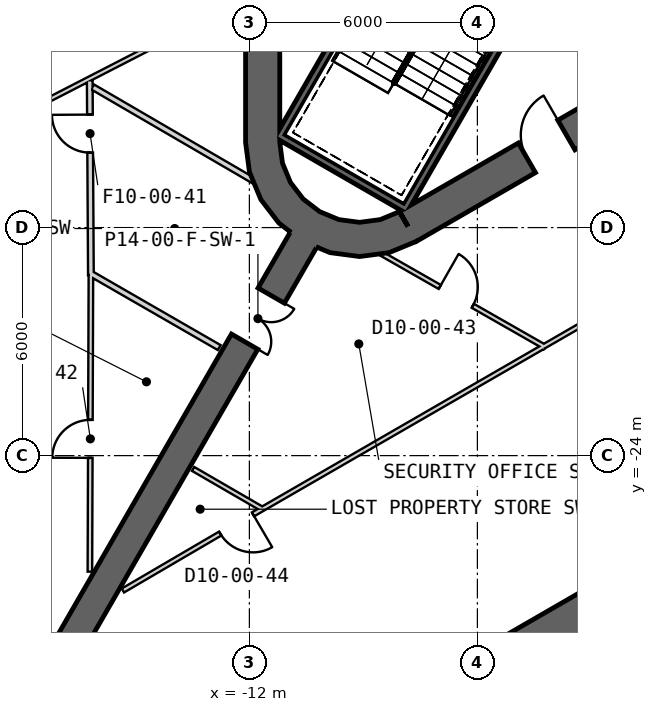
"""IFC4 building model, lengths in metres.
Left out: names, types, materials, properties, quantities, classifications, styles, units other than length and angle.
Written with IfcOpenShell. Run it as: python <this file> out.ifc"""

import sys

from ifc_helpers import new_model, si_unit, direction, frame, frame_2d, origin, place, context, subcontext, project, spatial, polyline, rectangle, outline, extrude, element, fill, save


model = new_model("IFC4")
c1 = context("Model", 3, precision=1e-05, world=origin(), true_north=direction((0.0, 1.0)))
c2 = subcontext(c1, "Body", "Model", "MODEL_VIEW")
j1 = project(units=[si_unit("LENGTHUNIT", "METRE"), si_unit("PLANEANGLEUNIT", "RADIAN")], contexts=[c1])
p1 = place(None, origin())
s1 = spatial("IfcSite", under=j1, at=p1, CompositionType="ELEMENT")
p2 = place(p1, origin())
s2 = spatial("IfcBuilding", under=s1, at=p2, CompositionType="ELEMENT")
p3 = place(p2, origin())
s3 = spatial("IfcBuildingStorey", under=s2, at=p3, CompositionType="ELEMENT", Elevation=0.0)
p4 = place(p3, frame((-11.65, 15.762, 0.0), z_axis=(0.0, 0.0, 1.0), x_axis=(0.0, -1.0, 0.0)))
e1 = element("IfcWall", 1, at=p4, inside=s3, PredefinedType="SHEAR", context=c2, shape_type="SweptSolid", body=[
    extrude(rectangle(XDim=31.523, YDim=0.9, at=frame_2d((15.762, 0.0))), origin(), (0.0, 0.0, 1.0), 9.0),
])
p5 = place(p4, frame((7.062, 0.0, 0.0)))
e2 = element("IfcOpeningElement", 2, at=p5, cuts=e1, PredefinedType="OPENING", context=c2, shape_type="SweptSolid", body=[
    extrude(rectangle(XDim=1.2, YDim=2.4, at=frame_2d((0.6, 1.2))), frame((0.0, 0.46, 0.0), z_axis=(0.0, -1.0, 0.0), x_axis=(1.0, 0.0, 0.0)), (0.0, 0.0, 1.0), 0.92),
])
p6 = place(p4, frame((9.762, 0.0, 0.0)))
e3 = element("IfcOpeningElement", 3, at=p6, cuts=e1, PredefinedType="OPENING", context=c2, shape_type="SweptSolid", body=[
    extrude(rectangle(XDim=1.2, YDim=2.4, at=frame_2d((0.6, 1.2))), frame((0.0, 0.46, 0.0), z_axis=(0.0, -1.0, 0.0), x_axis=(1.0, 0.0, 0.0)), (0.0, 0.0, 1.0), 0.92),
])
p7 = place(p4, frame((12.462, 0.0, 0.0)))
e4 = element("IfcOpeningElement", 4, at=p7, cuts=e1, PredefinedType="OPENING", context=c2, shape_type="SweptSolid", body=[
    extrude(rectangle(XDim=1.2, YDim=2.4, at=frame_2d((0.6, 1.2))), frame((0.0, 0.46, 0.0), z_axis=(0.0, -1.0, 0.0), x_axis=(1.0, 0.0, 0.0)), (0.0, 0.0, 1.0), 0.92),
])
p8 = place(p4, frame((15.162, 0.0, 0.0)))
e5 = element("IfcOpeningElement", 5, at=p8, cuts=e1, PredefinedType="OPENING", context=c2, shape_type="SweptSolid", body=[
    extrude(rectangle(XDim=1.2, YDim=2.4, at=frame_2d((0.6, 1.2))), frame((0.0, 0.46, 0.0), z_axis=(0.0, -1.0, 0.0), x_axis=(1.0, 0.0, 0.0)), (0.0, 0.0, 1.0), 0.92),
])
p9 = place(p4, frame((17.862, 0.0, 0.0)))
e6 = element("IfcOpeningElement", 6, at=p9, cuts=e1, PredefinedType="OPENING", context=c2, shape_type="SweptSolid", body=[
    extrude(rectangle(XDim=1.2, YDim=2.4, at=frame_2d((0.6, 1.2))), frame((0.0, 0.46, 0.0), z_axis=(0.0, -1.0, 0.0), x_axis=(1.0, 0.0, 0.0)), (0.0, 0.0, 1.0), 0.92),
])
p10 = place(p4, frame((20.562, 0.0, 0.0)))
e7 = element("IfcOpeningElement", 7, at=p10, cuts=e1, PredefinedType="OPENING", context=c2, shape_type="SweptSolid", body=[
    extrude(rectangle(XDim=1.2, YDim=2.4, at=frame_2d((0.6, 1.2))), frame((0.0, 0.46, 0.0), z_axis=(0.0, -1.0, 0.0), x_axis=(1.0, 0.0, 0.0)), (0.0, 0.0, 1.0), 0.92),
])
p11 = place(p4, frame((23.262, 0.0, 0.0)))
e8 = element("IfcOpeningElement", 8, at=p11, cuts=e1, PredefinedType="OPENING", context=c2, shape_type="SweptSolid", body=[
    extrude(rectangle(XDim=1.2, YDim=2.4, at=frame_2d((0.6, 1.2))), frame((0.0, 0.46, 0.0), z_axis=(0.0, -1.0, 0.0), x_axis=(1.0, 0.0, 0.0)), (0.0, 0.0, 1.0), 0.92),
])
p12 = place(p4, frame((3.612, 0.0, 0.0)))
e9 = element("IfcOpeningElement", 9, at=p12, cuts=e1, PredefinedType="OPENING", context=c2, shape_type="SweptSolid", body=[
    extrude(rectangle(XDim=1.2, YDim=2.4, at=frame_2d((0.6, 1.2))), frame((0.0, 0.46, 0.0), z_axis=(0.0, -1.0, 0.0), x_axis=(1.0, 0.0, 0.0)), (0.0, 0.0, 1.0), 0.92),
])
p13 = place(p4, frame((26.712, 0.0, 0.0)))
e10 = element("IfcOpeningElement", 10, at=p13, cuts=e1, PredefinedType="OPENING", context=c2, shape_type="SweptSolid", body=[
    extrude(rectangle(XDim=1.2, YDim=2.4, at=frame_2d((0.6, 1.2))), frame((0.0, 0.46, 0.0), z_axis=(0.0, -1.0, 0.0), x_axis=(1.0, 0.0, 0.0)), (0.0, 0.0, 1.0), 0.92),
])
p14 = place(p3, frame((-7.825, -17.97, 0.0), z_axis=(0.0, 0.0, 1.0), x_axis=(0.866028369851, 0.499994862586, 0.0)))
e11 = element("IfcWall", 11, at=p14, inside=s3, PredefinedType="SHEAR", context=c2, shape_type="SweptSolid", body=[
    extrude(rectangle(XDim=31.523, YDim=0.9, at=frame_2d((15.762, 0.0))), origin(), (0.0, 0.0, 1.0), 9.0),
])
p15 = place(p14, frame((7.062, 0.0, 0.0)))
e12 = element("IfcOpeningElement", 12, at=p15, cuts=e11, PredefinedType="OPENING", context=c2, shape_type="SweptSolid", body=[
    extrude(rectangle(XDim=1.2, YDim=2.4, at=frame_2d((0.6, 1.2))), frame((0.0, 0.46, 0.0), z_axis=(0.0, -1.0, 0.0), x_axis=(1.0, 0.0, 0.0)), (0.0, 0.0, 1.0), 0.92),
])
p16 = place(p14, frame((9.762, 0.0, 0.0)))
e13 = element("IfcOpeningElement", 13, at=p16, cuts=e11, PredefinedType="OPENING", context=c2, shape_type="SweptSolid", body=[
    extrude(rectangle(XDim=1.2, YDim=2.4, at=frame_2d((0.6, 1.2))), frame((0.0, 0.46, 0.0), z_axis=(0.0, -1.0, 0.0), x_axis=(1.0, 0.0, 0.0)), (0.0, 0.0, 1.0), 0.92),
])
p17 = place(p14, frame((12.462, 0.0, 0.0)))
e14 = element("IfcOpeningElement", 14, at=p17, cuts=e11, PredefinedType="OPENING", context=c2, shape_type="SweptSolid", body=[
    extrude(rectangle(XDim=1.2, YDim=2.4, at=frame_2d((0.6, 1.2))), frame((0.0, 0.46, 0.0), z_axis=(0.0, -1.0, 0.0), x_axis=(1.0, 0.0, 0.0)), (0.0, 0.0, 1.0), 0.92),
])
p18 = place(p14, frame((15.162, 0.0, 0.0)))
e15 = element("IfcOpeningElement", 15, at=p18, cuts=e11, PredefinedType="OPENING", context=c2, shape_type="SweptSolid", body=[
    extrude(rectangle(XDim=1.2, YDim=2.4, at=frame_2d((0.6, 1.2))), frame((0.0, 0.46, 0.0), z_axis=(0.0, -1.0, 0.0), x_axis=(1.0, 0.0, 0.0)), (0.0, 0.0, 1.0), 0.92),
])
p19 = place(p14, frame((17.862, 0.0, 0.0)))
e16 = element("IfcOpeningElement", 16, at=p19, cuts=e11, PredefinedType="OPENING", context=c2, shape_type="SweptSolid", body=[
    extrude(rectangle(XDim=1.2, YDim=2.4, at=frame_2d((0.6, 1.2))), frame((0.0, 0.46, 0.0), z_axis=(0.0, -1.0, 0.0), x_axis=(1.0, 0.0, 0.0)), (0.0, 0.0, 1.0), 0.92),
])
p20 = place(p14, frame((20.562, 0.0, 0.0)))
e17 = element("IfcOpeningElement", 17, at=p20, cuts=e11, PredefinedType="OPENING", context=c2, shape_type="SweptSolid", body=[
    extrude(rectangle(XDim=1.2, YDim=2.4, at=frame_2d((0.6, 1.2))), frame((0.0, 0.46, 0.0), z_axis=(0.0, -1.0, 0.0), x_axis=(1.0, 0.0, 0.0)), (0.0, 0.0, 1.0), 0.92),
])
p21 = place(p14, frame((26.712, 0.0, 0.0)))
e18 = element("IfcOpeningElement", 18, at=p21, cuts=e11, PredefinedType="OPENING", context=c2, shape_type="SweptSolid", body=[
    extrude(rectangle(XDim=1.2, YDim=2.4, at=frame_2d((0.6, 1.2))), frame((0.0, 0.46, 0.0), z_axis=(0.0, -1.0, 0.0), x_axis=(1.0, 0.0, 0.0)), (0.0, 0.0, 1.0), 0.92),
])
p22 = place(p14, frame((3.612, 0.0, 0.0)))
e19 = element("IfcOpeningElement", 19, at=p22, cuts=e11, PredefinedType="OPENING", context=c2, shape_type="SweptSolid", body=[
    extrude(rectangle(XDim=1.2, YDim=2.4, at=frame_2d((0.6, 1.2))), frame((0.0, 0.46, 0.0), z_axis=(0.0, -1.0, 0.0), x_axis=(1.0, 0.0, 0.0)), (0.0, 0.0, 1.0), 0.92),
])
p23 = place(p3, origin())
e20 = element("IfcWall", 20, at=p23, inside=s3, PredefinedType="SHEAR", context=c2, shape_type="SweptSolid", body=[
    extrude(outline(polyline([(-12.1, -15.762), (-11.998, -16.538), (-11.698, -17.262), (-11.221, -17.883), (-10.6, -18.36), (-9.876, -18.659), (-9.1, -18.762), (-8.323, -18.659), (-7.6, -18.36), (-8.05, -17.58), (-8.556, -17.79), (-9.1, -17.862), (-9.644, -17.79), (-10.15, -17.58), (-10.585, -17.247), (-10.919, -16.812), (-11.128, -16.305), (-11.2, -15.762), (-12.1, -15.762)])), origin(), (0.0, 0.0, 1.0), 9.0),
])
p24 = place(p3, frame((-10.575, -18.316, 0.0), z_axis=(0.0, 0.0, 1.0), x_axis=(-0.499996575515, -0.866027380903, 0.0)))
e21 = element("IfcWall", 21, at=p24, inside=s3, PredefinedType="SHEAR", context=c2, shape_type="SweptSolid", body=[
    extrude(rectangle(XDim=13.954, YDim=0.8, at=frame_2d((6.977, 0.0))), origin(), (0.0, 0.0, 1.0), 9.0),
])
p25 = place(p24, frame((1.7, 0.0, 0.0)))
e22 = element("IfcOpeningElement", 22, at=p25, cuts=e21, PredefinedType="OPENING", context=c2, shape_type="SweptSolid", body=[
    extrude(rectangle(XDim=1.4, YDim=2.4, at=frame_2d((0.7, 1.2))), frame((0.0, 0.41, 0.0), z_axis=(0.0, -1.0, 0.0), x_axis=(1.0, 0.0, 0.0)), (0.0, 0.0, 1.0), 0.82),
])
p26 = place(p3, origin())
e23 = element("IfcWall", 23, at=p26, inside=s3, PredefinedType="SHEAR", context=c2, shape_type="SweptSolid", body=[
    extrude(outline(polyline([(-3.678, -31.63), (-0.214, -29.63), (-1.864, -26.772), (-5.328, -28.772), (-3.678, -31.63)])), origin(), (0.0, 0.0, 1.0), 9.0),
])
p27 = place(p3, frame((-2.558, -14.409, 0.0), z_axis=(0.0, 0.0, 1.0), x_axis=(-0.507997497166, 0.861358544901, 0.0)))
e24 = element("IfcWall", 24, at=p27, inside=s3, PredefinedType="PLUMBINGWALL", context=c2, shape_type="SweptSolid", body=[
    extrude(rectangle(XDim=3.35, YDim=0.2, at=frame_2d((1.675, 0.0))), origin(), (0.0, 0.0, 1.0), 8.7),
])
p28 = place(p3, frame((-3.905, -10.563, -0.4), z_axis=(0.0, 0.0, 1.0), x_axis=(-0.500012932018, -0.866017937352, 0.0)))
e25 = element("IfcWall", 25, at=p28, inside=s3, PredefinedType="SHEAR", context=c2, shape_type="SweptSolid", body=[
    extrude(rectangle(XDim=8.1, YDim=0.2, at=frame_2d((4.05, 0.0))), origin(), (0.0, 0.0, 1.0), 9.1),
])
p29 = place(p3, frame((-11.282, -15.541, -0.4), z_axis=(0.0, 0.0, 1.0), x_axis=(0.866000483506, -0.500043160704, 0.0)))
e26 = element("IfcWall", 26, at=p29, inside=s3, PredefinedType="SHEAR", context=c2, shape_type="SweptSolid", body=[
    extrude(rectangle(XDim=3.8, YDim=0.2, at=frame_2d((1.9, 0.0))), origin(), (0.0, 0.0, 1.0), 9.1),
])
p30 = place(p3, frame((-7.196, -8.663, -0.4), z_axis=(0.0, 0.0, 1.0), x_axis=(-0.499997992926, -0.866026562566, 0.0)))
e27 = element("IfcWall", 27, at=p30, inside=s3, PredefinedType="SHEAR", context=c2, shape_type="SweptSolid", body=[
    extrude(rectangle(XDim=7.9, YDim=0.2, at=frame_2d((3.95, 0.0))), origin(), (0.0, 0.0, 1.0), 9.1),
])
p31 = place(p3, frame((-8.707, -18.583, 0.0), z_axis=(0.0, 0.0, 1.0), x_axis=(0.868530929613, -0.495634970825, 0.0)))
e28 = element("IfcWall", 28, at=p31, inside=s3, PredefinedType="PARTITIONING", context=c2, shape_type="SweptSolid", body=[
    extrude(rectangle(XDim=5.166, YDim=0.12, at=frame_2d((2.583, 0.0))), origin(), (0.0, 0.0, 1.0), 7.67),
])
p32 = place(p31, frame((1.977, 0.0, 0.0)))
e29 = element("IfcOpeningElement", 29, at=p32, cuts=e28, PredefinedType="OPENING", context=c2, shape_type="SweptSolid", body=[
    extrude(rectangle(XDim=1.0, YDim=2.1, at=frame_2d((0.5, 1.05))), frame((0.0, 0.07, 0.0), z_axis=(0.0, -1.0, 0.0), x_axis=(1.0, 0.0, 0.0)), (0.0, 0.0, 1.0), 0.14),
])
p33 = place(p3, frame((-4.276, -21.14, 0.0), z_axis=(0.0, 0.0, 1.0), x_axis=(0.866026219638, 0.499998586897, 0.0)))
e30 = element("IfcWall", 30, at=p33, inside=s3, PredefinedType="PARTITIONING", context=c2, shape_type="SweptSolid", body=[
    extrude(rectangle(XDim=28.547, YDim=0.12, at=frame_2d((14.273, 0.0))), origin(), (0.0, 0.0, 1.0), 8.7),
])
p34 = place(p33, frame((20.947, 0.0, 0.0)))
e31 = element("IfcOpeningElement", 31, at=p34, cuts=e30, PredefinedType="OPENING", context=c2, shape_type="SweptSolid", body=[
    extrude(rectangle(XDim=1.8, YDim=2.1, at=frame_2d((0.9, 1.05))), frame((0.0, 0.07, 0.0), z_axis=(0.0, -1.0, 0.0), x_axis=(1.0, 0.0, 0.0)), (0.0, 0.0, 1.0), 0.14),
])
p35 = place(p33, frame((13.347, 0.0, 0.0)))
e32 = element("IfcOpeningElement", 32, at=p35, cuts=e30, PredefinedType="OPENING", context=c2, shape_type="SweptSolid", body=[
    extrude(rectangle(XDim=1.8, YDim=2.1, at=frame_2d((0.9, 1.05))), frame((0.0, 0.07, 0.0), z_axis=(0.0, -1.0, 0.0), x_axis=(1.0, 0.0, 0.0)), (0.0, 0.0, 1.0), 0.14),
])
p36 = place(p33, frame((5.747, 0.0, 0.0)))
e33 = element("IfcOpeningElement", 33, at=p36, cuts=e30, PredefinedType="OPENING", context=c2, shape_type="SweptSolid", body=[
    extrude(rectangle(XDim=1.8, YDim=2.1, at=frame_2d((0.9, 1.05))), frame((0.0, 0.07, 0.0), z_axis=(0.0, -1.0, 0.0), x_axis=(1.0, 0.0, 0.0)), (0.0, 0.0, 1.0), 0.14),
])
p37 = place(p3, frame((-4.276, -21.14, 0.0), z_axis=(0.0, 0.0, 1.0), x_axis=(-0.866020735843, -0.500008085025, 0.0)))
e34 = element("IfcWall", 34, at=p37, inside=s3, PredefinedType="PARTITIONING", context=c2, shape_type="SweptSolid", body=[
    extrude(rectangle(XDim=8.558, YDim=0.12, at=frame_2d((4.279, 0.0))), origin(), (0.0, 0.0, 1.0), 7.78),
])
p38 = place(p3, frame((-16.197, -27.053, 0.0), z_axis=(0.0, 0.0, 1.0), x_axis=(0.003407082, 0.999994195879, 0.0)))
e35 = element("IfcWall", 35, at=p38, inside=s3, PredefinedType="PARTITIONING", context=c2, shape_type="SweptSolid", body=[
    extrude(rectangle(XDim=7.811, YDim=0.12, at=frame_2d((3.905, 0.0))), origin(), (0.0, 0.0, 1.0), 7.78),
])
p39 = place(p38, frame((2.994, 0.0, 0.0)))
e36 = element("IfcOpeningElement", 36, at=p39, cuts=e35, PredefinedType="OPENING", context=c2, shape_type="SweptSolid", body=[
    extrude(rectangle(XDim=1.0, YDim=2.1, at=frame_2d((0.5, 1.05))), frame((0.0, 0.07, 0.0), z_axis=(0.0, -1.0, 0.0), x_axis=(1.0, 0.0, 0.0)), (0.0, 0.0, 1.0), 0.14),
])
p40 = place(p3, frame((-16.2, -19.195, 0.0), z_axis=(0.0, 0.0, 1.0), x_axis=(0.866480040483, -0.499211718057, 0.0)))
e37 = element("IfcWall", 37, at=p40, inside=s3, PredefinedType="PLUMBINGWALL", context=c2, shape_type="SweptSolid", body=[
    extrude(rectangle(XDim=3.932, YDim=0.15, at=frame_2d((1.966, 0.0))), origin(), (0.0, 0.0, 1.0), 7.78),
])
p41 = place(p3, frame((-16.17, -19.243, 0.0), z_axis=(0.0, 0.0, 1.0), x_axis=(-0.006010481517, 0.999981936893, 0.0)))
e38 = element("IfcWall", 38, at=p41, inside=s3, PredefinedType="PLUMBINGWALL", context=c2, shape_type="SweptSolid", body=[
    extrude(rectangle(XDim=5.118, YDim=0.15, at=frame_2d((2.559, 0.0))), origin(), (0.0, 0.0, 1.0), 7.88),
])
p42 = place(p41, frame((3.216, 0.0, 0.0)))
e39 = element("IfcOpeningElement", 39, at=p42, cuts=e38, PredefinedType="OPENING", context=c2, shape_type="SweptSolid", body=[
    extrude(rectangle(XDim=1.0, YDim=2.1, at=frame_2d((0.5, 1.05))), frame((0.0, 0.085, 0.0), z_axis=(0.0, -1.0, 0.0), x_axis=(1.0, 0.0, 0.0)), (0.0, 0.0, 1.0), 0.17),
])
p43 = place(p3, frame((-11.729, -16.86, 0.0), z_axis=(0.0, 0.0, 1.0), x_axis=(-0.864161643102, 0.503214322721, 0.0)))
e40 = element("IfcWall", 40, at=p43, inside=s3, PredefinedType="PLUMBINGWALL", context=c2, shape_type="SweptSolid", body=[
    extrude(rectangle(XDim=5.086, YDim=0.15, at=frame_2d((2.543, 0.0))), origin(), (0.0, 0.0, 1.0), 7.78),
])
p44 = place(p3, frame((-13.481, -24.35, 0.0), z_axis=(0.0, 0.0, 1.0), x_axis=(0.865282890553, -0.501283870992, 0.0)))
e41 = element("IfcWall", 41, at=p44, inside=s3, PredefinedType="PARTITIONING", context=c2, shape_type="SweptSolid", body=[
    extrude(rectangle(XDim=2.138, YDim=0.12, at=frame_2d((1.069, 0.0))), origin(), (0.0, 0.0, 1.0), 8.7),
])
p45 = place(p3, frame((-11.688, -25.419, 0.0), z_axis=(0.0, 0.0, 1.0), x_axis=(-0.863165231754, -0.50492156093, 0.0)))
e42 = element("IfcWall", 42, at=p45, inside=s3, PredefinedType="PARTITIONING", context=c2, shape_type="SweptSolid", body=[
    extrude(rectangle(XDim=4.218, YDim=0.12, at=frame_2d((2.109, 0.0))), origin(), (0.0, 0.0, 1.0), 8.7),
])
p46 = place(p45, frame((0.25, 0.0, 0.0)))
e43 = element("IfcOpeningElement", 43, at=p46, cuts=e42, PredefinedType="OPENING", context=c2, shape_type="SweptSolid", body=[
    extrude(rectangle(XDim=1.0, YDim=2.1, at=frame_2d((0.5, 1.05))), frame((0.0, 0.07, 0.0), z_axis=(0.0, -1.0, 0.0), x_axis=(1.0, 0.0, 0.0)), (0.0, 0.0, 1.0), 0.14),
])
p47 = place(p3, frame((-16.23, -12.071, 0.0), z_axis=(0.0, 0.0, 1.0), x_axis=(-0.889183605382, -0.457550561053, 0.0)))
e44 = element("IfcWall", 44, at=p47, inside=s3, PredefinedType="PARTITIONING", context=c2, shape_type="SweptSolid", body=[
    extrude(rectangle(XDim=6.999, YDim=0.12, at=frame_2d((3.5, 0.0))), origin(), (0.0, 0.0, 1.0), 8.7),
])
p48 = place(p47, frame((2.499, 0.0, 0.0)))
e45 = element("IfcOpeningElement", 45, at=p48, cuts=e44, PredefinedType="OPENING", context=c2, shape_type="SweptSolid", body=[
    extrude(rectangle(XDim=1.8, YDim=2.1, at=frame_2d((0.9, 1.05))), frame((0.0, 0.07, 0.0), z_axis=(0.0, -1.0, 0.0), x_axis=(1.0, 0.0, 0.0)), (0.0, 0.0, 1.0), 0.14),
])
p49 = place(p3, frame((-24.302, -18.249, 0.0), z_axis=(0.0, 0.0, 1.0), x_axis=(0.889186002608, 0.45754590236, 0.0)))
e46 = element("IfcWall", 46, at=p49, inside=s3, PredefinedType="PARTITIONING", context=c2, shape_type="SweptSolid", body=[
    extrude(rectangle(XDim=12.543, YDim=0.12, at=frame_2d((6.272, 0.0))), origin(), (0.0, 0.0, 1.0), 7.88),
])
p50 = place(p49, frame((5.375, 0.0, 0.0)))
e47 = element("IfcOpeningElement", 47, at=p50, cuts=e46, PredefinedType="OPENING", context=c2, shape_type="SweptSolid", body=[
    extrude(rectangle(XDim=1.8, YDim=2.1, at=frame_2d((0.9, 1.05))), frame((0.0, 0.07, 0.0), z_axis=(0.0, -1.0, 0.0), x_axis=(1.0, 0.0, 0.0)), (0.0, 0.0, 1.0), 0.14),
])
p51 = place(p42, origin())
e48 = element("IfcDoor", 48, at=p51, inside=s3, OperationType="SINGLE_SWING_RIGHT", PredefinedType="USERDEFINED", context=c2, shape_type="SweptSolid", body=[
    extrude(rectangle(XDim=1.0, YDim=2.1, at=frame_2d((0.5, 1.05))), frame((0.0, 0.025, 0.0), z_axis=(0.0, -1.0, 0.0), x_axis=(1.0, 0.0, 0.0)), (0.0, 0.0, 1.0), 0.05),
])
fill(e39, e48)
p52 = place(p39, origin())
e49 = element("IfcDoor", 49, at=p52, inside=s3, OperationType="SINGLE_SWING_LEFT", PredefinedType="NOTDEFINED", context=c2, shape_type="SweptSolid", body=[
    extrude(rectangle(XDim=1.0, YDim=2.1, at=frame_2d((0.5, 1.05))), frame((0.0, 0.025, 0.0), z_axis=(0.0, -1.0, 0.0), x_axis=(1.0, 0.0, 0.0)), (0.0, 0.0, 1.0), 0.05),
])
fill(e36, e49)
p53 = place(p32, origin())
e50 = element("IfcDoor", 50, at=p53, inside=s3, OperationType="SINGLE_SWING_LEFT", PredefinedType="NOTDEFINED", context=c2, shape_type="SweptSolid", body=[
    extrude(rectangle(XDim=1.0, YDim=2.1, at=frame_2d((0.5, 1.05))), frame((0.0, 0.025, 0.0), z_axis=(0.0, -1.0, 0.0), x_axis=(1.0, 0.0, 0.0)), (0.0, 0.0, 1.0), 0.05),
])
fill(e29, e50)
p54 = place(p46, origin())
e51 = element("IfcDoor", 51, at=p54, inside=s3, OperationType="SINGLE_SWING_LEFT", PredefinedType="NOTDEFINED", context=c2, shape_type="SweptSolid", body=[
    extrude(rectangle(XDim=1.0, YDim=2.1, at=frame_2d((0.5, 1.05))), frame((0.0, 0.025, 0.0), z_axis=(0.0, -1.0, 0.0), x_axis=(1.0, 0.0, 0.0)), (0.0, 0.0, 1.0), 0.05),
])
fill(e43, e51)
p55 = place(p22, origin())
e52 = element("IfcDoor", 52, at=p55, inside=s3, OperationType="SINGLE_SWING_RIGHT", PredefinedType="USERDEFINED", context=c2, shape_type="SweptSolid", body=[
    extrude(rectangle(XDim=1.2, YDim=2.4, at=frame_2d((0.6, 1.2))), frame((0.0, 0.025, 0.0), z_axis=(0.0, -1.0, 0.0), x_axis=(1.0, 0.0, 0.0)), (0.0, 0.0, 1.0), 0.05),
])
fill(e19, e52)
p56 = place(p25, origin())
e53 = element("IfcDoor", 53, at=p56, inside=s3, OperationType="DOUBLE_DOOR_SINGLE_SWING", PredefinedType="NOTDEFINED", context=c2, shape_type="SweptSolid", body=[
    extrude(rectangle(XDim=1.4, YDim=2.4, at=frame_2d((0.7, 1.2))), frame((0.0, 0.025, 0.0), z_axis=(0.0, -1.0, 0.0), x_axis=(1.0, 0.0, 0.0)), (0.0, 0.0, 1.0), 0.05),
])
fill(e22, e53)
save(model, sys.argv[1])
